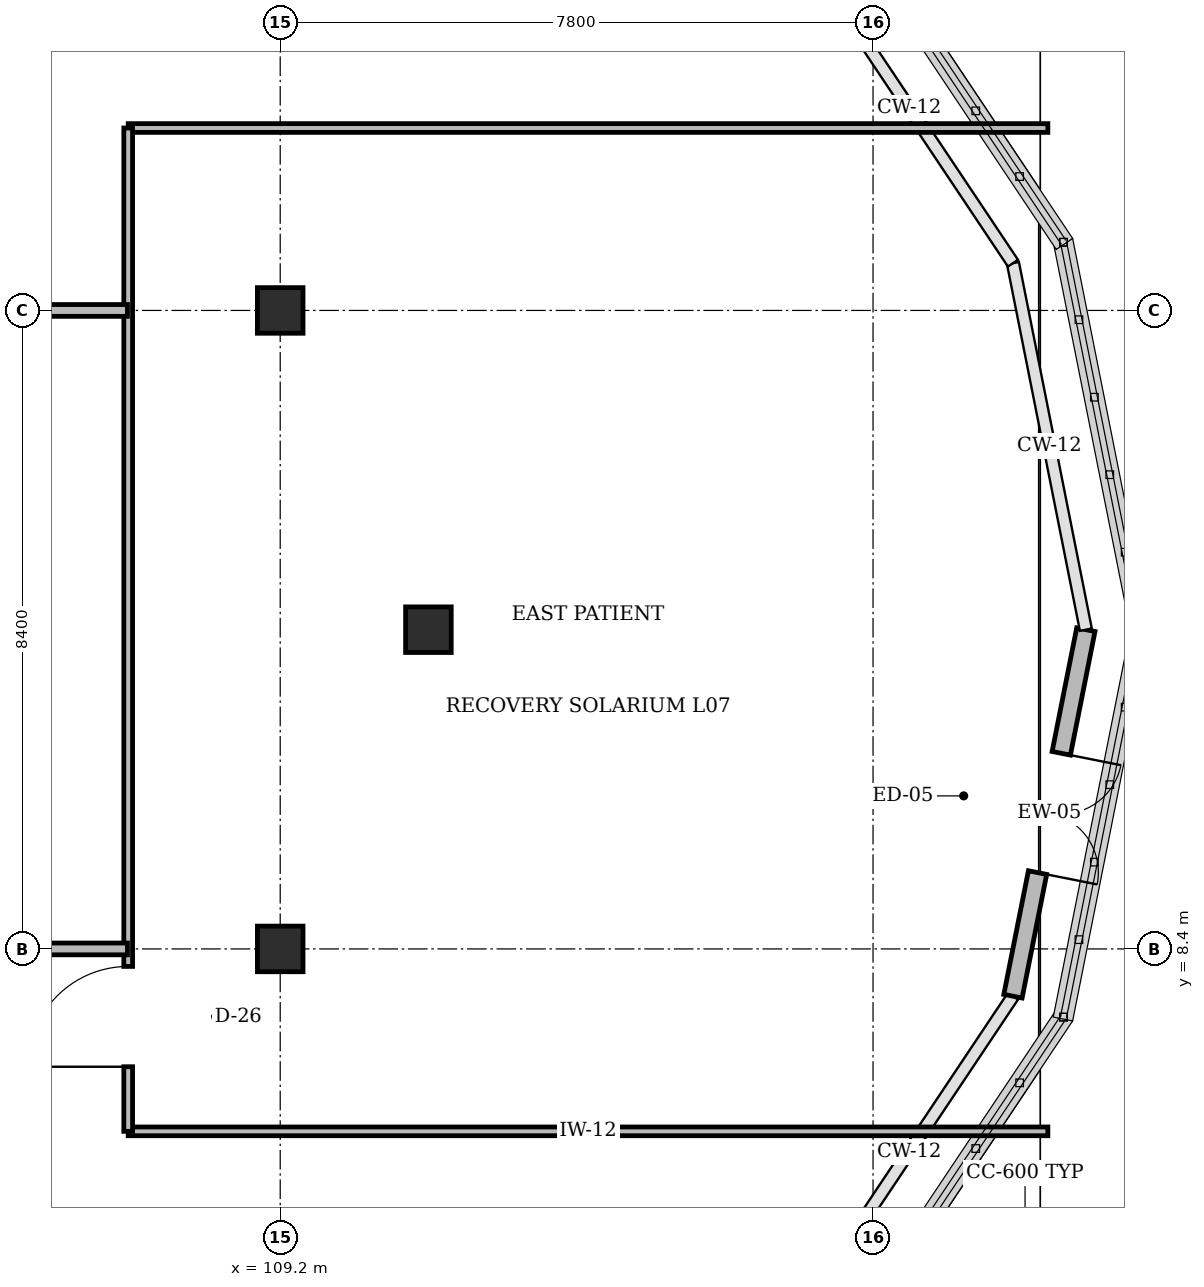
"""IFC4 building model, lengths in metres.
Left out: names, types, materials, properties, quantities, classifications, styles, units other than length and angle.
Written with IfcOpenShell. Run it as: python <this file> out.ifc"""

import sys

from ifc_helpers import new_model, si_unit, direction, frame, frame_2d, origin, origin_2d, place, context, subcontext, project, spatial, rectangle, circle, extrude, element, fill, save


model = new_model("IFC4")
c1 = context("Model", 3, precision=1e-05, world=origin(), true_north=direction((0.0, 1.0)))
c2 = subcontext(c1, "Body", "Model", "MODEL_VIEW")
j1 = project(units=[si_unit("LENGTHUNIT", "METRE"), si_unit("PLANEANGLEUNIT", "RADIAN")], contexts=[c1])
p1 = place(None, origin())
s1 = spatial("IfcSite", under=j1, at=p1, CompositionType="ELEMENT")
p2 = place(p1, origin())
s2 = spatial("IfcBuilding", under=s1, at=p2, CompositionType="ELEMENT")
p3 = place(p2, frame((0.0, 0.0, 30.6)))
s3 = spatial("IfcBuildingStorey", under=s2, at=p3, CompositionType="ELEMENT", Elevation=30.6)
for number, where, z_axis, x_axis in (
    (1, (109.2, 8.4, 0.0), (0.0, 0.0, 1.0), (1.0, 0.0, 0.0)),
    (2, (109.2, 16.8, 0.0), (0.0, 0.0, 1.0), (1.0, 0.0, 0.0)),
):
    element("IfcColumn", number, at=place(p3, frame(where, z_axis=z_axis, x_axis=x_axis)), inside=s3, PredefinedType="COLUMN", context=c2, shape_type="SweptSolid", body=[
        extrude(rectangle(XDim=0.6, YDim=0.6, at=origin_2d()), origin(), (0.0, 0.0, 1.0), 4.2),
    ])
p4 = place(p3, frame((111.15, 12.6, 0.0), z_axis=(0.0, 0.0, 1.0), x_axis=(1.0, 0.0, 0.0)))
e3 = element("IfcColumn", 3, at=p4, inside=s3, PredefinedType="PILASTER", context=c2, shape_type="SweptSolid", body=[
    extrude(circle(Radius=0.3, at=origin_2d()), origin(), (0.0, 0.0, 1.0), 3.95),
])
p5 = place(p3, frame((119.8, 12.6, 0.0), z_axis=(0.0, 0.0, 1.0), x_axis=(-0.195113286981, -0.980780712108, 0.0)))
e4 = element("IfcWall", 4, at=p5, inside=s3, PredefinedType="STANDARD", context=c2, shape_type="SweptSolid", body=[
    extrude(rectangle(XDim=4.916, YDim=0.245, at=frame_2d((2.458, 0.0))), origin(), (0.0, 0.0, 1.0), 3.32),
])
p6 = place(p5, frame((1.658, 0.0, 0.0)))
e5 = element("IfcOpeningElement", 5, at=p6, cuts=e4, PredefinedType="OPENING", context=c2, shape_type="SweptSolid", body=[
    extrude(rectangle(XDim=1.6, YDim=2.2, at=frame_2d((0.8, 1.1))), frame((0.0, 0.133, 0.0), z_axis=(0.0, -1.0, 0.0), x_axis=(1.0, 0.0, 0.0)), (0.0, 0.0, 1.0), 0.265),
])
for number, where, z_axis, x_axis in (
    (6, (107.2, 6.0, 0.0), (0.0, 0.0, 1.0), (1.0, 0.0, 0.0)),
    (7, (107.2, 19.2, 0.0), (0.0, 0.0, 1.0), (1.0, 0.0, 0.0)),
):
    element("IfcWall", number, at=place(p3, frame(where, z_axis=z_axis, x_axis=x_axis)), inside=s3, PredefinedType="PARTITIONING", context=c2, shape_type="SweptSolid", body=[
        extrude(rectangle(XDim=12.1, YDim=0.115, at=frame_2d((6.05, 0.0))), origin(), (0.0, 0.0, 1.0), 3.9),
    ])
p7 = place(p3, frame((107.2, 6.0, 0.0), z_axis=(0.0, 0.0, 1.0), x_axis=(0.0, 1.0, 0.0)))
e8 = element("IfcWall", 8, at=p7, inside=s3, PredefinedType="PARTITIONING", context=c2, shape_type="SweptSolid", body=[
    extrude(rectangle(XDim=13.2, YDim=0.115, at=frame_2d((6.6, 0.0))), origin(), (0.0, 0.0, 1.0), 3.9),
])
p8 = place(p7, frame((0.85, 0.0, 0.0)))
e9 = element("IfcOpeningElement", 9, at=p8, cuts=e8, PredefinedType="OPENING", context=c2, shape_type="SweptSolid", body=[
    extrude(rectangle(XDim=1.32, YDim=2.15, at=frame_2d((0.66, 1.075))), frame((0.0, 0.067, 0.0), z_axis=(0.0, -1.0, 0.0), x_axis=(1.0, 0.0, 0.0)), (0.0, 0.0, 1.0), 0.135),
])
p9 = place(p3, frame((101.96, 8.4, 0.0), z_axis=(0.0, 0.0, 1.0), x_axis=(1.0, 0.0, 0.0)))
e10 = element("IfcWall", 10, at=p9, inside=s3, PredefinedType="PARTITIONING", context=c2, shape_type="SweptSolid", body=[
    extrude(rectangle(XDim=5.23, YDim=0.155, at=frame_2d((2.615, 0.0))), origin(), (0.0, 0.0, 1.0), 3.305),
])
p10 = place(p9, frame((1.915, 0.0, 0.0)))
e11 = element("IfcOpeningElement", 11, at=p10, cuts=e10, PredefinedType="OPENING", context=c2, shape_type="SweptSolid", body=[
    extrude(rectangle(XDim=1.4, YDim=2.2, at=frame_2d((0.7, 1.1))), frame((0.0, 0.087, 0.0), z_axis=(0.0, -1.0, 0.0), x_axis=(1.0, 0.0, 0.0)), (0.0, 0.0, 1.0), 0.175),
])
p11 = place(p3, frame((101.96, 16.8, 0.0), z_axis=(0.0, 0.0, 1.0), x_axis=(1.0, 0.0, 0.0)))
e12 = element("IfcWall", 12, at=p11, inside=s3, PredefinedType="PARTITIONING", context=c2, shape_type="SweptSolid", body=[
    extrude(rectangle(XDim=5.23, YDim=0.155, at=frame_2d((2.615, 0.0))), origin(), (0.0, 0.0, 1.0), 3.305),
])
p12 = place(p6, origin())
e13 = element("IfcDoor", 13, at=p12, inside=s3, OperationType="DOUBLE_DOOR_SINGLE_SWING", PredefinedType="DOOR", context=c2, shape_type="SweptSolid", body=[
    extrude(rectangle(XDim=1.6, YDim=2.2, at=frame_2d((0.8, 1.1))), frame((0.0, 0.025, 0.0), z_axis=(0.0, -1.0, 0.0), x_axis=(1.0, 0.0, 0.0)), (0.0, 0.0, 1.0), 0.05),
])
fill(e5, e13)
p13 = place(p8, origin())
e14 = element("IfcDoor", 14, at=p13, inside=s3, OperationType="SINGLE_SWING_LEFT", PredefinedType="DOOR", context=c2, shape_type="SweptSolid", body=[
    extrude(rectangle(XDim=1.32, YDim=2.15, at=frame_2d((0.66, 1.075))), frame((0.0, 0.025, 0.0), z_axis=(0.0, -1.0, 0.0), x_axis=(1.0, 0.0, 0.0)), (0.0, 0.0, 1.0), 0.05),
])
fill(e9, e14)
save(model, sys.argv[1])
